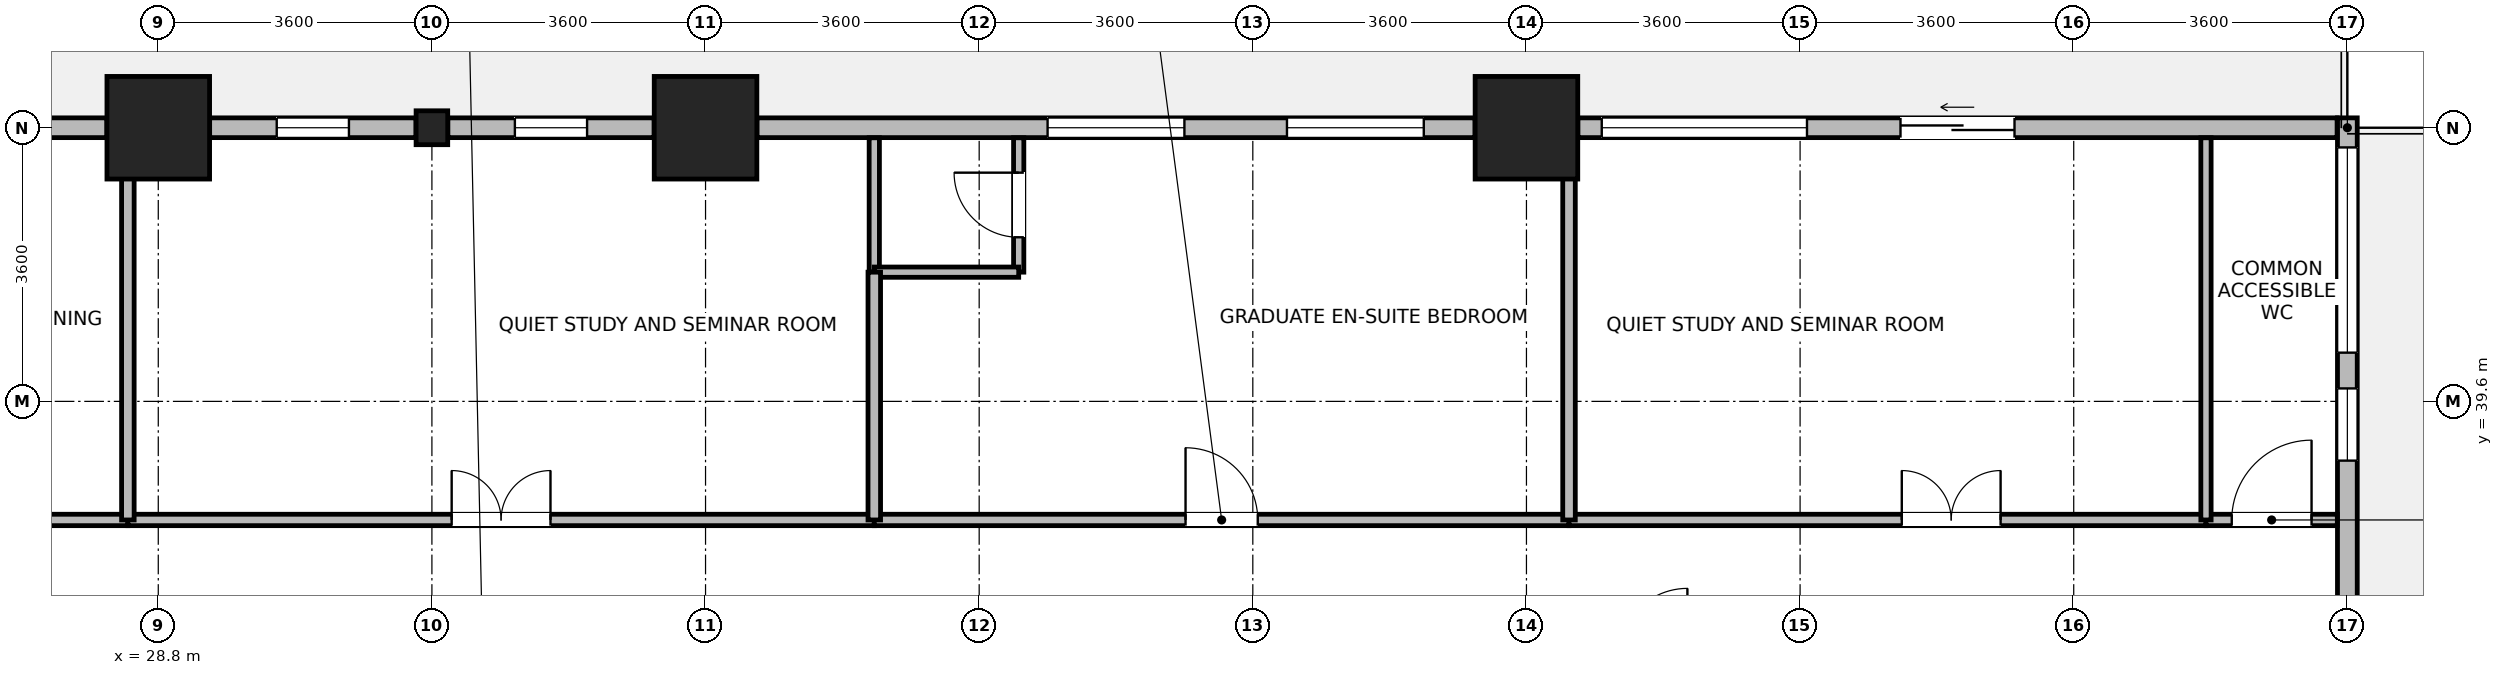
"""IFC4 building model, lengths in metres.
Left out: names, types, materials, properties, quantities, classifications, styles, units other than length and angle.
Written with IfcOpenShell. Run it as: python <this file> out.ifc"""

import sys

from ifc_helpers import new_model, si_unit, direction, frame, frame_2d, origin, origin_2d, place, context, subcontext, project, spatial, rectangle, i_section, extrude, source, transform, mapped, element, fill, save


model = new_model("IFC4")
c1 = context("Model", 3, precision=1e-05, world=origin(), true_north=direction((0.0, 1.0)))
c2 = subcontext(c1, "Body", "Model", "MODEL_VIEW")
j1 = project(units=[si_unit("LENGTHUNIT", "METRE"), si_unit("PLANEANGLEUNIT", "RADIAN")], contexts=[c1])
p1 = place(None, origin())
s1 = spatial("IfcSite", under=j1, at=p1, CompositionType="ELEMENT")
p2 = place(p1, origin())
s2 = spatial("IfcBuilding", under=s1, at=p2, CompositionType="ELEMENT")
p3 = place(p2, frame((0.0, 0.0, 25.3)))
s3 = spatial("IfcBuildingStorey", under=s2, at=p3, CompositionType="ELEMENT", Elevation=25.3)
m1 = source(origin(), c2, "Body", "SweptSolid", [
    extrude(rectangle(XDim=1.35, YDim=1.35, at=origin_2d()), origin(), (0.0, 0.0, 1.0), 3.7),
])
for number, where, z_axis, x_axis in (
    (1, (28.8, 43.2, 0.0), (0.0, 0.0, 1.0), (1.0, 0.0, 0.0)),
    (2, (36.0, 43.2, 0.0), (0.0, 0.0, 1.0), (1.0, 0.0, 0.0)),
    (3, (46.8, 43.2, 0.0), (0.0, 0.0, 1.0), (1.0, 0.0, 0.0)),
):
    element("IfcColumn", number, at=place(p3, frame(where, z_axis=z_axis, x_axis=x_axis)), inside=s3, PredefinedType="COLUMN", context=c2, shape_type="MappedRepresentation", body=[
        mapped(m1, transform((0.0, 0.0, 0.0), x_axis=(1.0, 0.0, 0.0), y_axis=(0.0, 1.0, 0.0), z_axis=(0.0, 0.0, 1.0), scale=1.0)),
    ])
m2 = source(origin(), c2, "Body", "SweptSolid", [
    extrude(i_section(OverallWidth=0.416, OverallDepth=0.446, WebThickness=0.029, FlangeThickness=0.04, FilletRadius=0.015, at=origin_2d()), origin(), (0.0, 0.0, 1.0), 3.7),
])
p4 = place(p3, frame((32.4, 43.2, 0.0), z_axis=(0.0, 0.0, 1.0), x_axis=(1.0, 0.0, 0.0)))
e4 = element("IfcColumn", 4, at=p4, inside=s3, PredefinedType="COLUMN", context=c2, shape_type="MappedRepresentation", body=[
    mapped(m2, transform((0.0, 0.0, 0.0), x_axis=(1.0, 0.0, 0.0), y_axis=(0.0, 1.0, 0.0), z_axis=(0.0, 0.0, 1.0), scale=1.0)),
])
p5 = place(p3, frame((57.6, 43.33, 0.0), z_axis=(0.0, 0.0, 1.0), x_axis=(0.0, -1.0, 0.0)))
e5 = element("IfcWall", 5, at=p5, inside=s3, PredefinedType="STANDARD", context=c2, shape_type="SweptSolid", body=[
    extrude(rectangle(XDim=6.956, YDim=0.26, at=frame_2d((3.478, 0.0))), origin(), (0.0, 0.0, 1.0), 3.43),
])
p6 = place(p5, frame((0.389, 0.0, 0.85)))
e6 = element("IfcOpeningElement", 6, at=p6, cuts=e5, PredefinedType="OPENING", context=c2, shape_type="SweptSolid", body=[
    extrude(rectangle(XDim=2.7, YDim=2.05, at=frame_2d((1.35, 1.025))), frame((0.0, 0.14, 0.0), z_axis=(0.0, -1.0, 0.0), x_axis=(1.0, 0.0, 0.0)), (0.0, 0.0, 1.0), 0.28),
])
p7 = place(p5, frame((3.56, 0.0, 0.85)))
e7 = element("IfcOpeningElement", 7, at=p7, cuts=e5, PredefinedType="OPENING", context=c2, shape_type="SweptSolid", body=[
    extrude(rectangle(XDim=0.95, YDim=1.75, at=frame_2d((0.475, 0.875))), frame((0.0, 0.14, 0.0), z_axis=(0.0, -1.0, 0.0), x_axis=(1.0, 0.0, 0.0)), (0.0, 0.0, 1.0), 0.28),
])
p8 = place(p3, frame((47.476, 43.2, 0.0), z_axis=(0.0, 0.0, 1.0), x_axis=(1.0, 0.0, 0.0)))
e8 = element("IfcWall", 8, at=p8, inside=s3, PredefinedType="STANDARD", context=c2, shape_type="SweptSolid", body=[
    extrude(rectangle(XDim=9.989, YDim=0.26, at=frame_2d((4.995, 0.0))), origin(), (0.0, 0.0, 1.0), 3.43),
])
p9 = place(p8, frame((4.245, 0.0, 0.0)))
e9 = element("IfcOpeningElement", 9, at=p9, cuts=e8, PredefinedType="OPENING", context=c2, shape_type="SweptSolid", body=[
    extrude(rectangle(XDim=1.5, YDim=2.15, at=frame_2d((0.75, 1.075))), frame((0.0, 0.14, 0.0), z_axis=(0.0, -1.0, 0.0), x_axis=(1.0, 0.0, 0.0)), (0.0, 0.0, 1.0), 0.28),
])
p10 = place(p8, frame((0.315, 0.0, 0.85)))
e10 = element("IfcOpeningElement", 10, at=p10, cuts=e8, PredefinedType="OPENING", context=c2, shape_type="SweptSolid", body=[
    extrude(rectangle(XDim=2.7, YDim=2.05, at=frame_2d((1.35, 1.025))), frame((0.0, 0.14, 0.0), z_axis=(0.0, -1.0, 0.0), x_axis=(1.0, 0.0, 0.0)), (0.0, 0.0, 1.0), 0.28),
])
p11 = place(p3, frame((36.676, 43.2, 0.0), z_axis=(0.0, 0.0, 1.0), x_axis=(1.0, 0.0, 0.0)))
e11 = element("IfcWall", 11, at=p11, inside=s3, PredefinedType="STANDARD", context=c2, shape_type="SweptSolid", body=[
    extrude(rectangle(XDim=9.448, YDim=0.26, at=frame_2d((4.724, 0.0))), origin(), (0.0, 0.0, 1.0), 2.93),
])
p12 = place(p11, frame((3.824, 0.0, 0.85)))
e12 = element("IfcOpeningElement", 12, at=p12, cuts=e11, PredefinedType="OPENING", context=c2, shape_type="SweptSolid", body=[
    extrude(rectangle(XDim=1.8, YDim=1.85, at=frame_2d((0.9, 0.925))), frame((0.0, 0.14, 0.0), z_axis=(0.0, -1.0, 0.0), x_axis=(1.0, 0.0, 0.0)), (0.0, 0.0, 1.0), 0.28),
])
p13 = place(p11, frame((6.973, 0.0, 0.85)))
e13 = element("IfcOpeningElement", 13, at=p13, cuts=e11, PredefinedType="OPENING", context=c2, shape_type="SweptSolid", body=[
    extrude(rectangle(XDim=1.8, YDim=1.85, at=frame_2d((0.9, 0.925))), frame((0.0, 0.14, 0.0), z_axis=(0.0, -1.0, 0.0), x_axis=(1.0, 0.0, 0.0)), (0.0, 0.0, 1.0), 0.28),
])
p14 = place(p3, frame((32.609, 43.2, 0.0), z_axis=(0.0, 0.0, 1.0), x_axis=(1.0, 0.0, 0.0)))
e14 = element("IfcWall", 14, at=p14, inside=s3, PredefinedType="STANDARD", context=c2, shape_type="SweptSolid", body=[
    extrude(rectangle(XDim=2.715, YDim=0.26, at=frame_2d((1.357, 0.0))), origin(), (0.0, 0.0, 1.0), 2.93),
])
p15 = place(p14, frame((0.883, 0.0, 0.85)))
e15 = element("IfcOpeningElement", 15, at=p15, cuts=e14, PredefinedType="OPENING", context=c2, shape_type="SweptSolid", body=[
    extrude(rectangle(XDim=0.95, YDim=1.75, at=frame_2d((0.475, 0.875))), frame((0.0, 0.14, 0.0), z_axis=(0.0, -1.0, 0.0), x_axis=(1.0, 0.0, 0.0)), (0.0, 0.0, 1.0), 0.28),
])
p16 = place(p3, frame((29.476, 43.2, 0.0), z_axis=(0.0, 0.0, 1.0), x_axis=(1.0, 0.0, 0.0)))
e16 = element("IfcWall", 16, at=p16, inside=s3, PredefinedType="STANDARD", context=c2, shape_type="SweptSolid", body=[
    extrude(rectangle(XDim=2.715, YDim=0.26, at=frame_2d((1.357, 0.0))), origin(), (0.0, 0.0, 1.0), 2.93),
])
p17 = place(p16, frame((0.883, 0.0, 0.85)))
e17 = element("IfcOpeningElement", 17, at=p17, cuts=e16, PredefinedType="OPENING", context=c2, shape_type="SweptSolid", body=[
    extrude(rectangle(XDim=0.95, YDim=1.75, at=frame_2d((0.475, 0.875))), frame((0.0, 0.14, 0.0), z_axis=(0.0, -1.0, 0.0), x_axis=(1.0, 0.0, 0.0)), (0.0, 0.0, 1.0), 0.28),
])
p18 = place(p3, frame((25.409, 43.2, 0.0), z_axis=(0.0, 0.0, 1.0), x_axis=(1.0, 0.0, 0.0)))
e18 = element("IfcWall", 18, at=p18, inside=s3, PredefinedType="STANDARD", context=c2, shape_type="SweptSolid", body=[
    extrude(rectangle(XDim=2.715, YDim=0.26, at=frame_2d((1.357, 0.0))), origin(), (0.0, 0.0, 1.0), 2.93),
])
p19 = place(p18, frame((0.883, 0.0, 0.85)))
e19 = element("IfcOpeningElement", 19, at=p19, cuts=e18, PredefinedType="OPENING", context=c2, shape_type="SweptSolid", body=[
    extrude(rectangle(XDim=0.95, YDim=1.75, at=frame_2d((0.475, 0.875))), frame((0.0, 0.14, 0.0), z_axis=(0.0, -1.0, 0.0), x_axis=(1.0, 0.0, 0.0)), (0.0, 0.0, 1.0), 0.28),
])
p20 = place(p3, frame((38.22, 41.3, 0.0), z_axis=(0.0, 0.0, 1.0), x_axis=(0.0, 1.0, 0.0)))
e20 = element("IfcWall", 20, at=p20, inside=s3, PredefinedType="PARTITIONING", context=c2, shape_type="SweptSolid", body=[
    extrude(rectangle(XDim=1.768, YDim=0.135, at=frame_2d((0.884, 0.0))), origin(), (0.0, 0.0, 1.0), 3.43),
])
p21 = place(p3, frame((40.12, 41.3, 0.0), z_axis=(0.0, 0.0, 1.0), x_axis=(0.0, 1.0, 0.0)))
e21 = element("IfcWall", 21, at=p21, inside=s3, PredefinedType="PARTITIONING", context=c2, shape_type="SweptSolid", body=[
    extrude(rectangle(XDim=1.768, YDim=0.135, at=frame_2d((0.884, 0.0))), origin(), (0.0, 0.0, 1.0), 3.43),
])
p22 = place(p21, frame((0.459, 0.0, 0.0)))
e22 = element("IfcOpeningElement", 22, at=p22, cuts=e21, PredefinedType="OPENING", context=c2, shape_type="SweptSolid", body=[
    extrude(rectangle(XDim=0.85, YDim=2.04, at=frame_2d((0.425, 1.02))), frame((0.0, 0.078, 0.0), z_axis=(0.0, -1.0, 0.0), x_axis=(1.0, 0.0, 0.0)), (0.0, 0.0, 1.0), 0.155),
])
p23 = place(p3, frame((38.22, 41.3, 0.0), z_axis=(0.0, 0.0, 1.0), x_axis=(1.0, 0.0, 0.0)))
e23 = element("IfcWall", 23, at=p23, inside=s3, PredefinedType="PARTITIONING", context=c2, shape_type="SweptSolid", body=[
    extrude(rectangle(XDim=1.9, YDim=0.135, at=frame_2d((0.95, 0.0))), origin(), (0.0, 0.0, 1.0), 3.43),
])
p24 = place(p3, frame((16.58, 38.04, 0.0), z_axis=(0.0, 0.0, 1.0), x_axis=(1.0, 0.0, 0.0)))
e24 = element("IfcWall", 24, at=p24, inside=s3, PredefinedType="PARTITIONING", context=c2, shape_type="SweptSolid", body=[
    extrude(rectangle(XDim=11.82, YDim=0.15, at=frame_2d((5.91, 0.0))), origin(), (0.0, 0.0, 1.0), 3.43),
])
p25 = place(p24, frame((5.46, 0.0, 0.0)))
e25 = element("IfcOpeningElement", 25, at=p25, cuts=e24, PredefinedType="OPENING", context=c2, shape_type="SweptSolid", body=[
    extrude(rectangle(XDim=0.9, YDim=2.08, at=frame_2d((0.45, 1.04))), frame((0.0, 0.085, 0.0), z_axis=(0.0, -1.0, 0.0), x_axis=(1.0, 0.0, 0.0)), (0.0, 0.0, 1.0), 0.17),
])
p26 = place(p3, frame((28.4, 38.04, 0.0), z_axis=(0.0, 0.0, 1.0), x_axis=(1.0, 0.0, 0.0)))
e26 = element("IfcWall", 26, at=p26, inside=s3, PredefinedType="PARTITIONING", context=c2, shape_type="SweptSolid", body=[
    extrude(rectangle(XDim=9.82, YDim=0.15, at=frame_2d((4.91, 0.0))), origin(), (0.0, 0.0, 1.0), 3.43),
])
p27 = place(p26, frame((4.26, 0.0, 0.0)))
e27 = element("IfcOpeningElement", 27, at=p27, cuts=e26, PredefinedType="OPENING", context=c2, shape_type="SweptSolid", body=[
    extrude(rectangle(XDim=1.3, YDim=2.12, at=frame_2d((0.65, 1.06))), frame((0.0, 0.085, 0.0), z_axis=(0.0, -1.0, 0.0), x_axis=(1.0, 0.0, 0.0)), (0.0, 0.0, 1.0), 0.17),
])
p28 = place(p3, frame((38.22, 38.04, 0.0), z_axis=(0.0, 0.0, 1.0), x_axis=(1.0, 0.0, 0.0)))
e28 = element("IfcWall", 28, at=p28, inside=s3, PredefinedType="PARTITIONING", context=c2, shape_type="SweptSolid", body=[
    extrude(rectangle(XDim=9.14, YDim=0.15, at=frame_2d((4.57, 0.0))), origin(), (0.0, 0.0, 1.0), 3.43),
])
p29 = place(p28, frame((4.095, 0.0, 0.0)))
e29 = element("IfcOpeningElement", 29, at=p29, cuts=e28, PredefinedType="OPENING", context=c2, shape_type="SweptSolid", body=[
    extrude(rectangle(XDim=0.95, YDim=2.1, at=frame_2d((0.475, 1.05))), frame((0.0, 0.085, 0.0), z_axis=(0.0, -1.0, 0.0), x_axis=(1.0, 0.0, 0.0)), (0.0, 0.0, 1.0), 0.17),
])
p30 = place(p3, frame((47.36, 38.04, 0.0), z_axis=(0.0, 0.0, 1.0), x_axis=(1.0, 0.0, 0.0)))
e30 = element("IfcWall", 30, at=p30, inside=s3, PredefinedType="PARTITIONING", context=c2, shape_type="SweptSolid", body=[
    extrude(rectangle(XDim=8.38, YDim=0.15, at=frame_2d((4.19, 0.0))), origin(), (0.0, 0.0, 1.0), 3.43),
])
p31 = place(p30, frame((4.378, 0.0, 0.0)))
e31 = element("IfcOpeningElement", 31, at=p31, cuts=e30, PredefinedType="OPENING", context=c2, shape_type="SweptSolid", body=[
    extrude(rectangle(XDim=1.3, YDim=2.12, at=frame_2d((0.65, 1.06))), frame((0.0, 0.085, 0.0), z_axis=(0.0, -1.0, 0.0), x_axis=(1.0, 0.0, 0.0)), (0.0, 0.0, 1.0), 0.17),
])
p32 = place(p3, frame((55.74, 38.04, 0.0), z_axis=(0.0, 0.0, 1.0), x_axis=(1.0, 0.0, 0.0)))
e32 = element("IfcWall", 32, at=p32, inside=s3, PredefinedType="PARTITIONING", context=c2, shape_type="SweptSolid", body=[
    extrude(rectangle(XDim=1.728, YDim=0.15, at=frame_2d((0.864, 0.0))), origin(), (0.0, 0.0, 1.0), 3.43),
])
p33 = place(p32, frame((0.339, 0.0, 0.0)))
e33 = element("IfcOpeningElement", 33, at=p33, cuts=e32, PredefinedType="OPENING", context=c2, shape_type="SweptSolid", body=[
    extrude(rectangle(XDim=1.05, YDim=2.12, at=frame_2d((0.525, 1.06))), frame((0.0, 0.085, 0.0), z_axis=(0.0, -1.0, 0.0), x_axis=(1.0, 0.0, 0.0)), (0.0, 0.0, 1.0), 0.17),
])
for number, where, z_axis, x_axis in (
    (34, (28.4, 38.04, 0.0), (0.0, 0.0, 1.0), (0.0, 1.0, 0.0)),
    (35, (47.36, 38.04, 0.0), (0.0, 0.0, 1.0), (0.0, 1.0, 0.0)),
):
    element("IfcWall", number, at=place(p3, frame(where, z_axis=z_axis, x_axis=x_axis)), inside=s3, PredefinedType="PARTITIONING", context=c2, shape_type="SweptSolid", body=[
        extrude(rectangle(XDim=5.028, YDim=0.165, at=frame_2d((2.514, 0.0))), origin(), (0.0, 0.0, 1.0), 3.43),
    ])
p34 = place(p3, frame((55.74, 38.04, 0.0), z_axis=(0.0, 0.0, 1.0), x_axis=(0.0, 1.0, 0.0)))
e36 = element("IfcWall", 36, at=p34, inside=s3, PredefinedType="PARTITIONING", context=c2, shape_type="SweptSolid", body=[
    extrude(rectangle(XDim=5.028, YDim=0.135, at=frame_2d((2.514, 0.0))), origin(), (0.0, 0.0, 1.0), 3.43),
])
p35 = place(p3, frame((38.22, 38.04, 0.0), z_axis=(0.0, 0.0, 1.0), x_axis=(0.0, 1.0, 0.0)))
e37 = element("IfcWall", 37, at=p35, inside=s3, PredefinedType="PARTITIONING", context=c2, shape_type="SweptSolid", body=[
    extrude(rectangle(XDim=3.26, YDim=0.165, at=frame_2d((1.63, 0.0))), origin(), (0.0, 0.0, 1.0), 3.43),
])
p36 = place(p6, origin())
e38 = element("IfcWindow", 38, at=p36, inside=s3, PartitioningType="SINGLE_PANEL", PredefinedType="WINDOW", context=c2, shape_type="SweptSolid", body=[
    extrude(rectangle(XDim=2.7, YDim=2.05, at=frame_2d((1.35, 1.025))), frame((0.0, 0.03, 0.0), z_axis=(0.0, -1.0, 0.0), x_axis=(1.0, 0.0, 0.0)), (0.0, 0.0, 1.0), 0.06),
])
fill(e6, e38)
p37 = place(p7, origin())
e39 = element("IfcWindow", 39, at=p37, inside=s3, PartitioningType="SINGLE_PANEL", PredefinedType="WINDOW", context=c2, shape_type="SweptSolid", body=[
    extrude(rectangle(XDim=0.95, YDim=1.75, at=frame_2d((0.475, 0.875))), frame((0.0, 0.03, 0.0), z_axis=(0.0, -1.0, 0.0), x_axis=(1.0, 0.0, 0.0)), (0.0, 0.0, 1.0), 0.06),
])
fill(e7, e39)
p38 = place(p9, origin())
e40 = element("IfcDoor", 40, at=p38, inside=s3, OperationType="SLIDING_TO_LEFT", PredefinedType="DOOR", context=c2, shape_type="SweptSolid", body=[
    extrude(rectangle(XDim=1.5, YDim=2.15, at=frame_2d((0.75, 1.075))), frame((0.0, 0.025, 0.0), z_axis=(0.0, -1.0, 0.0), x_axis=(1.0, 0.0, 0.0)), (0.0, 0.0, 1.0), 0.05),
])
fill(e9, e40)
p39 = place(p10, origin())
e41 = element("IfcWindow", 41, at=p39, inside=s3, PartitioningType="SINGLE_PANEL", PredefinedType="WINDOW", context=c2, shape_type="SweptSolid", body=[
    extrude(rectangle(XDim=2.7, YDim=2.05, at=frame_2d((1.35, 1.025))), frame((0.0, 0.03, 0.0), z_axis=(0.0, -1.0, 0.0), x_axis=(1.0, 0.0, 0.0)), (0.0, 0.0, 1.0), 0.06),
])
fill(e10, e41)
p40 = place(p12, origin())
e42 = element("IfcWindow", 42, at=p40, inside=s3, PartitioningType="SINGLE_PANEL", PredefinedType="WINDOW", context=c2, shape_type="SweptSolid", body=[
    extrude(rectangle(XDim=1.8, YDim=1.85, at=frame_2d((0.9, 0.925))), frame((0.0, 0.03, 0.0), z_axis=(0.0, -1.0, 0.0), x_axis=(1.0, 0.0, 0.0)), (0.0, 0.0, 1.0), 0.06),
])
fill(e12, e42)
p41 = place(p13, origin())
e43 = element("IfcWindow", 43, at=p41, inside=s3, PartitioningType="SINGLE_PANEL", PredefinedType="WINDOW", context=c2, shape_type="SweptSolid", body=[
    extrude(rectangle(XDim=1.8, YDim=1.85, at=frame_2d((0.9, 0.925))), frame((0.0, 0.03, 0.0), z_axis=(0.0, -1.0, 0.0), x_axis=(1.0, 0.0, 0.0)), (0.0, 0.0, 1.0), 0.06),
])
fill(e13, e43)
p42 = place(p15, origin())
e44 = element("IfcWindow", 44, at=p42, inside=s3, PartitioningType="SINGLE_PANEL", PredefinedType="WINDOW", context=c2, shape_type="SweptSolid", body=[
    extrude(rectangle(XDim=0.95, YDim=1.75, at=frame_2d((0.475, 0.875))), frame((0.0, 0.03, 0.0), z_axis=(0.0, -1.0, 0.0), x_axis=(1.0, 0.0, 0.0)), (0.0, 0.0, 1.0), 0.06),
])
fill(e15, e44)
p43 = place(p17, origin())
e45 = element("IfcWindow", 45, at=p43, inside=s3, PartitioningType="SINGLE_PANEL", PredefinedType="WINDOW", context=c2, shape_type="SweptSolid", body=[
    extrude(rectangle(XDim=0.95, YDim=1.75, at=frame_2d((0.475, 0.875))), frame((0.0, 0.03, 0.0), z_axis=(0.0, -1.0, 0.0), x_axis=(1.0, 0.0, 0.0)), (0.0, 0.0, 1.0), 0.06),
])
fill(e17, e45)
p44 = place(p22, origin())
e46 = element("IfcDoor", 46, at=p44, inside=s3, OperationType="SINGLE_SWING_RIGHT", PredefinedType="DOOR", context=c2, shape_type="SweptSolid", body=[
    extrude(rectangle(XDim=0.85, YDim=2.04, at=frame_2d((0.425, 1.02))), frame((0.0, 0.025, 0.0), z_axis=(0.0, -1.0, 0.0), x_axis=(1.0, 0.0, 0.0)), (0.0, 0.0, 1.0), 0.05),
])
fill(e22, e46)
p45 = place(p27, origin())
e47 = element("IfcDoor", 47, at=p45, inside=s3, OperationType="DOUBLE_DOOR_SINGLE_SWING", PredefinedType="DOOR", context=c2, shape_type="SweptSolid", body=[
    extrude(rectangle(XDim=1.3, YDim=2.12, at=frame_2d((0.65, 1.06))), frame((0.0, 0.025, 0.0), z_axis=(0.0, -1.0, 0.0), x_axis=(1.0, 0.0, 0.0)), (0.0, 0.0, 1.0), 0.05),
])
fill(e27, e47)
p46 = place(p29, origin())
e48 = element("IfcDoor", 48, at=p46, inside=s3, OperationType="SINGLE_SWING_LEFT", PredefinedType="DOOR", context=c2, shape_type="SweptSolid", body=[
    extrude(rectangle(XDim=0.95, YDim=2.1, at=frame_2d((0.475, 1.05))), frame((0.0, 0.025, 0.0), z_axis=(0.0, -1.0, 0.0), x_axis=(1.0, 0.0, 0.0)), (0.0, 0.0, 1.0), 0.05),
])
fill(e29, e48)
p47 = place(p31, origin())
e49 = element("IfcDoor", 49, at=p47, inside=s3, OperationType="DOUBLE_DOOR_SINGLE_SWING", PredefinedType="DOOR", context=c2, shape_type="SweptSolid", body=[
    extrude(rectangle(XDim=1.3, YDim=2.12, at=frame_2d((0.65, 1.06))), frame((0.0, 0.025, 0.0), z_axis=(0.0, -1.0, 0.0), x_axis=(1.0, 0.0, 0.0)), (0.0, 0.0, 1.0), 0.05),
])
fill(e31, e49)
p48 = place(p33, origin())
e50 = element("IfcDoor", 50, at=p48, inside=s3, OperationType="SINGLE_SWING_RIGHT", PredefinedType="DOOR", context=c2, shape_type="SweptSolid", body=[
    extrude(rectangle(XDim=1.05, YDim=2.12, at=frame_2d((0.525, 1.06))), frame((0.0, 0.025, 0.0), z_axis=(0.0, -1.0, 0.0), x_axis=(1.0, 0.0, 0.0)), (0.0, 0.0, 1.0), 0.05),
])
fill(e33, e50)
save(model, sys.argv[1])
